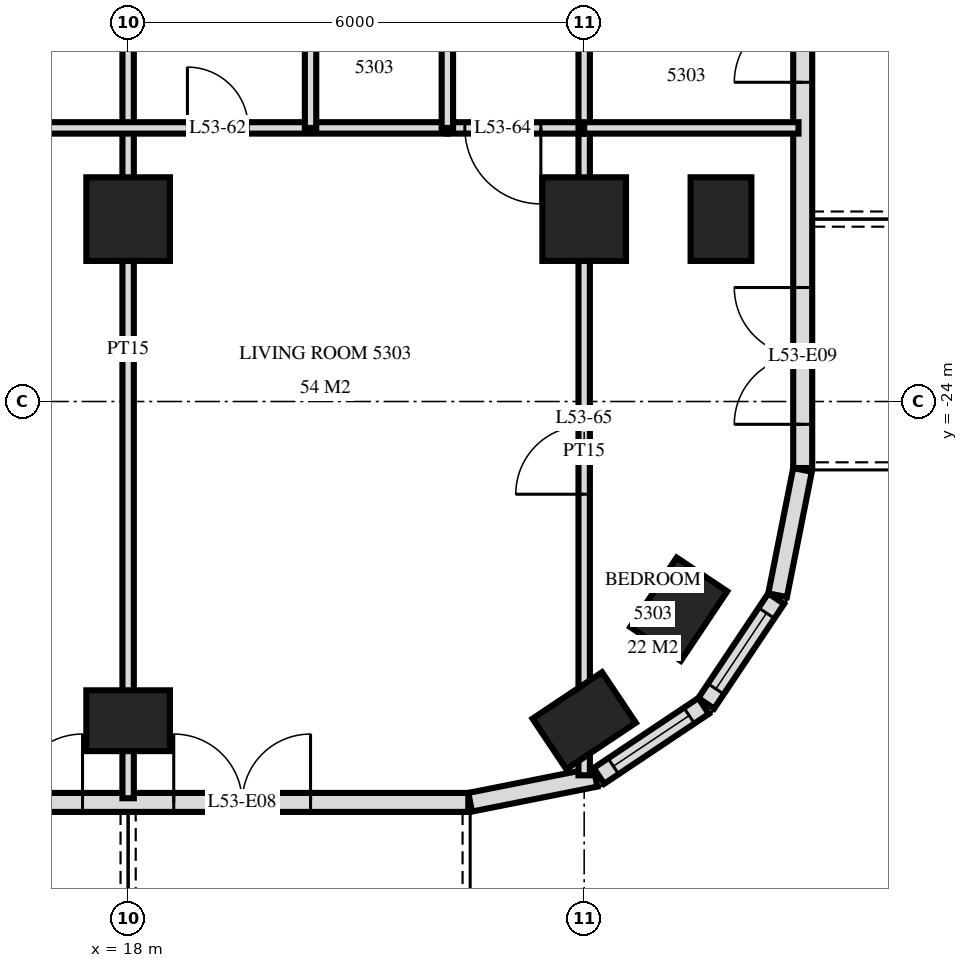
"""IFC4 building model, lengths in metres.
Left out: names, types, materials, properties, quantities, classifications, styles, units other than length and angle.
Written with IfcOpenShell. Run it as: python <this file> out.ifc"""

import sys

from ifc_helpers import new_model, si_unit, direction, frame, frame_2d, origin, origin_2d, place, context, subcontext, project, spatial, rectangle, extrude, element, fill, save


model = new_model("IFC4")
c1 = context("Model", 3, precision=1e-05, world=origin(), true_north=direction((0.0, 1.0)))
c2 = subcontext(c1, "Body", "Model", "MODEL_VIEW")
j1 = project(units=[si_unit("LENGTHUNIT", "METRE"), si_unit("PLANEANGLEUNIT", "RADIAN")], contexts=[c1])
p1 = place(None, origin())
s1 = spatial("IfcSite", under=j1, at=p1, CompositionType="ELEMENT")
p2 = place(p1, origin())
s2 = spatial("IfcBuilding", under=s1, at=p2, CompositionType="ELEMENT")
p3 = place(p2, frame((0.0, 0.0, 204.6)))
s3 = spatial("IfcBuildingStorey", under=s2, at=p3, CompositionType="ELEMENT", Elevation=204.6)
p4 = place(p3, frame((18.0, -28.2, 0.0), z_axis=(0.0, 0.0, 1.0), x_axis=(1.0, 0.0, 0.0)))
e1 = element("IfcColumn", 1, at=p4, inside=s3, PredefinedType="COLUMN", context=c2, shape_type="SweptSolid", body=[
    extrude(rectangle(XDim=1.1, YDim=0.8, at=origin_2d()), origin(), (0.0, 0.0, 1.0), 3.5),
])
p5 = place(p3, frame((18.0, -21.6, 0.0), z_axis=(0.0, 0.0, 1.0), x_axis=(1.0, 0.0, 0.0)))
e2 = element("IfcColumn", 2, at=p5, inside=s3, PredefinedType="COLUMN", context=c2, shape_type="SweptSolid", body=[
    extrude(rectangle(XDim=1.1, YDim=1.1, at=origin_2d()), origin(), (0.0, 0.0, 1.0), 3.5),
])
p6 = place(p3, frame((24.0, -28.2, 0.0), z_axis=(0.0, 0.0, 1.0), x_axis=(0.831459915646, 0.555584744817, 0.0)))
e3 = element("IfcColumn", 3, at=p6, inside=s3, PredefinedType="COLUMN", context=c2, shape_type="SweptSolid", body=[
    extrude(rectangle(XDim=1.1, YDim=0.8, at=origin_2d()), origin(), (0.0, 0.0, 1.0), 3.5),
])
p7 = place(p3, frame((24.0, -21.6, 0.0), z_axis=(0.0, 0.0, 1.0), x_axis=(1.0, 0.0, 0.0)))
e4 = element("IfcColumn", 4, at=p7, inside=s3, PredefinedType="COLUMN", context=c2, shape_type="SweptSolid", body=[
    extrude(rectangle(XDim=1.1, YDim=1.1, at=origin_2d()), origin(), (0.0, 0.0, 1.0), 3.5),
])
for number, where, z_axis, x_axis in (
    (5, (25.244, -26.733, 0.0), (0.0, 0.0, 1.0), (0.556, 0.831, 0.0)),
    (6, (25.8, -21.6, 0.0), (0.0, 0.0, 1.0), (0.0, 1.0, 0.0)),
):
    element("IfcColumn", number, at=place(p3, frame(where, z_axis=z_axis, x_axis=x_axis)), inside=s3, PredefinedType="COLUMN", context=c2, shape_type="SweptSolid", body=[
        extrude(rectangle(XDim=1.1, YDim=0.8, at=origin_2d()), origin(), (0.0, 0.0, 1.0), 3.5),
    ])
p8 = place(p3, frame((-22.475, -29.275, 0.0), z_axis=(0.0, 0.0, 1.0), x_axis=(1.0, 0.0, 0.0)))
e7 = element("IfcWall", 7, at=p8, inside=s3, PredefinedType="SOLIDWALL", context=c2, shape_type="SweptSolid", body=[
    extrude(rectangle(XDim=44.951, YDim=0.25, at=frame_2d((22.475, 0.0))), origin(), (0.0, 0.0, 1.0), 3.22),
])
p9 = place(p8, frame((0.575, 0.0, 0.0)))
e8 = element("IfcOpeningElement", 8, at=p9, cuts=e7, PredefinedType="OPENING", context=c2, shape_type="SweptSolid", body=[
    extrude(rectangle(XDim=1.8, YDim=2.4, at=frame_2d((0.9, 1.2))), frame((0.0, 0.135, 0.0), z_axis=(0.0, -1.0, 0.0), x_axis=(1.0, 0.0, 0.0)), (0.0, 0.0, 1.0), 0.27),
])
p10 = place(p8, frame((6.2, 0.0, 0.0)))
e9 = element("IfcOpeningElement", 9, at=p10, cuts=e7, PredefinedType="OPENING", context=c2, shape_type="SweptSolid", body=[
    extrude(rectangle(XDim=1.8, YDim=2.4, at=frame_2d((0.9, 1.2))), frame((0.0, 0.135, 0.0), z_axis=(0.0, -1.0, 0.0), x_axis=(1.0, 0.0, 0.0)), (0.0, 0.0, 1.0), 0.27),
])
p11 = place(p8, frame((8.45, 0.0, 0.9)))
e10 = element("IfcOpeningElement", 10, at=p11, cuts=e7, PredefinedType="OPENING", context=c2, shape_type="SweptSolid", body=[
    extrude(rectangle(XDim=1.8, YDim=1.5, at=frame_2d((0.9, 0.75))), frame((0.0, 0.135, 0.0), z_axis=(0.0, -1.0, 0.0), x_axis=(1.0, 0.0, 0.0)), (0.0, 0.0, 1.0), 0.27),
])
p12 = place(p8, frame((11.075, 0.0, 0.0)))
e11 = element("IfcOpeningElement", 11, at=p12, cuts=e7, PredefinedType="OPENING", context=c2, shape_type="SweptSolid", body=[
    extrude(rectangle(XDim=1.8, YDim=2.4, at=frame_2d((0.9, 1.2))), frame((0.0, 0.135, 0.0), z_axis=(0.0, -1.0, 0.0), x_axis=(1.0, 0.0, 0.0)), (0.0, 0.0, 1.0), 0.27),
])
p13 = place(p8, frame((13.775, 0.0, 0.9)))
e12 = element("IfcOpeningElement", 12, at=p13, cuts=e7, PredefinedType="OPENING", context=c2, shape_type="SweptSolid", body=[
    extrude(rectangle(XDim=2.4, YDim=1.5, at=frame_2d((1.2, 0.75))), frame((0.0, 0.135, 0.0), z_axis=(0.0, -1.0, 0.0), x_axis=(1.0, 0.0, 0.0)), (0.0, 0.0, 1.0), 0.27),
])
p14 = place(p8, frame((16.775, 0.0, 0.9)))
e13 = element("IfcOpeningElement", 13, at=p14, cuts=e7, PredefinedType="OPENING", context=c2, shape_type="SweptSolid", body=[
    extrude(rectangle(XDim=2.4, YDim=1.5, at=frame_2d((1.2, 0.75))), frame((0.0, 0.135, 0.0), z_axis=(0.0, -1.0, 0.0), x_axis=(1.0, 0.0, 0.0)), (0.0, 0.0, 1.0), 0.27),
])
p15 = place(p8, frame((20.075, 0.0, 0.0)))
e14 = element("IfcOpeningElement", 14, at=p15, cuts=e7, PredefinedType="OPENING", context=c2, shape_type="SweptSolid", body=[
    extrude(rectangle(XDim=1.8, YDim=2.4, at=frame_2d((0.9, 1.2))), frame((0.0, 0.135, 0.0), z_axis=(0.0, -1.0, 0.0), x_axis=(1.0, 0.0, 0.0)), (0.0, 0.0, 1.0), 0.27),
])
p16 = place(p8, frame((23.075, 0.0, 0.0)))
e15 = element("IfcOpeningElement", 15, at=p16, cuts=e7, PredefinedType="OPENING", context=c2, shape_type="SweptSolid", body=[
    extrude(rectangle(XDim=1.8, YDim=2.4, at=frame_2d((0.9, 1.2))), frame((0.0, 0.135, 0.0), z_axis=(0.0, -1.0, 0.0), x_axis=(1.0, 0.0, 0.0)), (0.0, 0.0, 1.0), 0.27),
])
p17 = place(p8, frame((25.775, 0.0, 0.9)))
e16 = element("IfcOpeningElement", 16, at=p17, cuts=e7, PredefinedType="OPENING", context=c2, shape_type="SweptSolid", body=[
    extrude(rectangle(XDim=2.4, YDim=1.5, at=frame_2d((1.2, 0.75))), frame((0.0, 0.135, 0.0), z_axis=(0.0, -1.0, 0.0), x_axis=(1.0, 0.0, 0.0)), (0.0, 0.0, 1.0), 0.27),
])
p18 = place(p8, frame((29.075, 0.0, 0.0)))
e17 = element("IfcOpeningElement", 17, at=p18, cuts=e7, PredefinedType="OPENING", context=c2, shape_type="SweptSolid", body=[
    extrude(rectangle(XDim=1.8, YDim=2.4, at=frame_2d((0.9, 1.2))), frame((0.0, 0.135, 0.0), z_axis=(0.0, -1.0, 0.0), x_axis=(1.0, 0.0, 0.0)), (0.0, 0.0, 1.0), 0.27),
])
p19 = place(p8, frame((31.775, 0.0, 0.9)))
e18 = element("IfcOpeningElement", 18, at=p19, cuts=e7, PredefinedType="OPENING", context=c2, shape_type="SweptSolid", body=[
    extrude(rectangle(XDim=2.4, YDim=1.5, at=frame_2d((1.2, 0.75))), frame((0.0, 0.135, 0.0), z_axis=(0.0, -1.0, 0.0), x_axis=(1.0, 0.0, 0.0)), (0.0, 0.0, 1.0), 0.27),
])
p20 = place(p8, frame((34.775, 0.0, 0.9)))
e19 = element("IfcOpeningElement", 19, at=p20, cuts=e7, PredefinedType="OPENING", context=c2, shape_type="SweptSolid", body=[
    extrude(rectangle(XDim=2.4, YDim=1.5, at=frame_2d((1.2, 0.75))), frame((0.0, 0.135, 0.0), z_axis=(0.0, -1.0, 0.0), x_axis=(1.0, 0.0, 0.0)), (0.0, 0.0, 1.0), 0.27),
])
p21 = place(p8, frame((38.075, 0.0, 0.0)))
e20 = element("IfcOpeningElement", 20, at=p21, cuts=e7, PredefinedType="OPENING", context=c2, shape_type="SweptSolid", body=[
    extrude(rectangle(XDim=1.8, YDim=2.4, at=frame_2d((0.9, 1.2))), frame((0.0, 0.135, 0.0), z_axis=(0.0, -1.0, 0.0), x_axis=(1.0, 0.0, 0.0)), (0.0, 0.0, 1.0), 0.27),
])
p22 = place(p8, frame((41.075, 0.0, 0.0)))
e21 = element("IfcOpeningElement", 21, at=p22, cuts=e7, PredefinedType="OPENING", context=c2, shape_type="SweptSolid", body=[
    extrude(rectangle(XDim=1.8, YDim=2.4, at=frame_2d((0.9, 1.2))), frame((0.0, 0.135, 0.0), z_axis=(0.0, -1.0, 0.0), x_axis=(1.0, 0.0, 0.0)), (0.0, 0.0, 1.0), 0.27),
])
p23 = place(p3, frame((22.5, -29.273, 0.0), z_axis=(0.0, 0.0, 1.0), x_axis=(0.980775640221, 0.19513878023, 0.0)))
e22 = element("IfcWall", 22, at=p23, inside=s3, PredefinedType="SOLIDWALL", context=c2, shape_type="SweptSolid", body=[
    extrude(rectangle(XDim=1.681, YDim=0.25, at=frame_2d((0.841, 0.0))), origin(), (0.0, 0.0, 1.0), 3.22),
])
p24 = place(p3, frame((24.194, -28.926, 0.0), z_axis=(0.0, 0.0, 1.0), x_axis=(0.831482937015, 0.55555029066, 0.0)))
e23 = element("IfcWall", 23, at=p24, inside=s3, PredefinedType="SOLIDWALL", context=c2, shape_type="SweptSolid", body=[
    extrude(rectangle(XDim=1.656, YDim=0.25, at=frame_2d((0.828, 0.0))), origin(), (0.0, 0.0, 1.0), 3.22),
])
p25 = place(p24, frame((0.228, 0.0, 0.9)))
e24 = element("IfcOpeningElement", 24, at=p25, cuts=e23, PredefinedType="OPENING", context=c2, shape_type="SweptSolid", body=[
    extrude(rectangle(XDim=1.2, YDim=1.5, at=frame_2d((0.6, 0.75))), frame((0.0, 0.135, 0.0), z_axis=(0.0, -1.0, 0.0), x_axis=(1.0, 0.0, 0.0)), (0.0, 0.0, 1.0), 0.27),
])
p26 = place(p3, frame((25.606, -27.971, 0.0), z_axis=(0.0, 0.0, 1.0), x_axis=(0.55555029066, 0.831482937015, 0.0)))
e25 = element("IfcWall", 25, at=p26, inside=s3, PredefinedType="SOLIDWALL", context=c2, shape_type="SweptSolid", body=[
    extrude(rectangle(XDim=1.656, YDim=0.25, at=frame_2d((0.828, 0.0))), origin(), (0.0, 0.0, 1.0), 3.22),
])
p27 = place(p26, frame((0.228, 0.0, 0.9)))
e26 = element("IfcOpeningElement", 26, at=p27, cuts=e25, PredefinedType="OPENING", context=c2, shape_type="SweptSolid", body=[
    extrude(rectangle(XDim=1.2, YDim=1.5, at=frame_2d((0.6, 0.75))), frame((0.0, 0.135, 0.0), z_axis=(0.0, -1.0, 0.0), x_axis=(1.0, 0.0, 0.0)), (0.0, 0.0, 1.0), 0.27),
])
p28 = place(p3, frame((26.545, -26.549, 0.0), z_axis=(0.0, 0.0, 1.0), x_axis=(0.195026884138, 0.980797896849, 0.0)))
e27 = element("IfcWall", 27, at=p28, inside=s3, PredefinedType="SOLIDWALL", context=c2, shape_type="SweptSolid", body=[
    extrude(rectangle(XDim=1.681, YDim=0.25, at=frame_2d((0.841, 0.0))), origin(), (0.0, 0.0, 1.0), 3.22),
])
p29 = place(p3, frame((26.875, -24.875, 0.0), z_axis=(0.0, 0.0, 1.0), x_axis=(0.0, 1.0, 0.0)))
e28 = element("IfcWall", 28, at=p29, inside=s3, PredefinedType="SOLIDWALL", context=c2, shape_type="SweptSolid", body=[
    extrude(rectangle(XDim=21.551, YDim=0.25, at=frame_2d((10.775, 0.0))), origin(), (0.0, 0.0, 1.0), 3.22),
])
p30 = place(p29, frame((0.575, 0.0, 0.0)))
e29 = element("IfcOpeningElement", 29, at=p30, cuts=e28, PredefinedType="OPENING", context=c2, shape_type="SweptSolid", body=[
    extrude(rectangle(XDim=1.8, YDim=2.4, at=frame_2d((0.9, 1.2))), frame((0.0, 0.135, 0.0), z_axis=(0.0, -1.0, 0.0), x_axis=(1.0, 0.0, 0.0)), (0.0, 0.0, 1.0), 0.27),
])
p31 = place(p29, frame((5.075, 0.0, 0.0)))
e30 = element("IfcOpeningElement", 30, at=p31, cuts=e28, PredefinedType="OPENING", context=c2, shape_type="SweptSolid", body=[
    extrude(rectangle(XDim=1.8, YDim=2.4, at=frame_2d((0.9, 1.2))), frame((0.0, 0.135, 0.0), z_axis=(0.0, -1.0, 0.0), x_axis=(1.0, 0.0, 0.0)), (0.0, 0.0, 1.0), 0.27),
])
p32 = place(p29, frame((8.075, 0.0, 0.9)))
e31 = element("IfcOpeningElement", 31, at=p32, cuts=e28, PredefinedType="OPENING", context=c2, shape_type="SweptSolid", body=[
    extrude(rectangle(XDim=1.2, YDim=1.5, at=frame_2d((0.6, 0.75))), frame((0.0, 0.135, 0.0), z_axis=(0.0, -1.0, 0.0), x_axis=(1.0, 0.0, 0.0)), (0.0, 0.0, 1.0), 0.27),
])
p33 = place(p29, frame((13.1, 0.0, 0.0)))
e32 = element("IfcOpeningElement", 32, at=p33, cuts=e28, PredefinedType="OPENING", context=c2, shape_type="SweptSolid", body=[
    extrude(rectangle(XDim=1.8, YDim=2.4, at=frame_2d((0.9, 1.2))), frame((0.0, 0.135, 0.0), z_axis=(0.0, -1.0, 0.0), x_axis=(1.0, 0.0, 0.0)), (0.0, 0.0, 1.0), 0.27),
])
p34 = place(p3, frame((24.0, -20.4, 0.0), z_axis=(0.0, 0.0, 1.0), x_axis=(0.0, 1.0, 0.0)))
e33 = element("IfcWall", 33, at=p34, inside=s3, PredefinedType="PARTITIONING", context=c2, shape_type="SweptSolid", body=[
    extrude(rectangle(XDim=3.0, YDim=0.15, at=frame_2d((1.5, 0.0))), origin(), (0.0, 0.0, 1.0), 3.22),
])
p35 = place(p34, frame((1.02, 0.0, 0.0)))
e34 = element("IfcOpeningElement", 34, at=p35, cuts=e33, PredefinedType="OPENING", context=c2, shape_type="SweptSolid", body=[
    extrude(rectangle(XDim=1.0, YDim=2.1, at=frame_2d((0.5, 1.05))), frame((0.0, 0.085, 0.0), z_axis=(0.0, -1.0, 0.0), x_axis=(1.0, 0.0, 0.0)), (0.0, 0.0, 1.0), 0.17),
])
p36 = place(p3, frame((24.0, -28.918, 0.0), z_axis=(0.0, 0.0, 1.0), x_axis=(0.0, 1.0, 0.0)))
e35 = element("IfcWall", 35, at=p36, inside=s3, PredefinedType="PARTITIONING", context=c2, shape_type="SweptSolid", body=[
    extrude(rectangle(XDim=8.518, YDim=0.15, at=frame_2d((4.259, 0.0))), origin(), (0.0, 0.0, 1.0), 3.22),
])
p37 = place(p36, frame((3.698, 0.0, 0.0)))
e36 = element("IfcOpeningElement", 36, at=p37, cuts=e35, PredefinedType="OPENING", context=c2, shape_type="SweptSolid", body=[
    extrude(rectangle(XDim=0.9, YDim=2.1, at=frame_2d((0.45, 1.05))), frame((0.0, 0.085, 0.0), z_axis=(0.0, -1.0, 0.0), x_axis=(1.0, 0.0, 0.0)), (0.0, 0.0, 1.0), 0.17),
])
for number, where, z_axis, x_axis in (
    (37, (22.2, -20.4, 0.0), (0.0, 0.0, 1.0), (0.0, 1.0, 0.0)),
    (38, (20.4, -20.4, 0.0), (0.0, 0.0, 1.0), (0.0, 1.0, 0.0)),
):
    element("IfcWall", number, at=place(p3, frame(where, z_axis=z_axis, x_axis=x_axis)), inside=s3, PredefinedType="PARTITIONING", context=c2, shape_type="SweptSolid", body=[
        extrude(rectangle(XDim=3.0, YDim=0.15, at=frame_2d((1.5, 0.0))), origin(), (0.0, 0.0, 1.0), 3.22),
    ])
p38 = place(p3, frame((18.0, -29.22, 0.0), z_axis=(0.0, 0.0, 1.0), x_axis=(0.0, 1.0, 0.0)))
e39 = element("IfcWall", 39, at=p38, inside=s3, PredefinedType="PARTITIONING", context=c2, shape_type="SweptSolid", body=[
    extrude(rectangle(XDim=11.82, YDim=0.15, at=frame_2d((5.91, 0.0))), origin(), (0.0, 0.0, 1.0), 3.22),
])
p39 = place(p3, frame((22.2, -20.4, 0.0), z_axis=(0.0, 0.0, 1.0), x_axis=(1.0, 0.0, 0.0)))
e40 = element("IfcWall", 40, at=p39, inside=s3, PredefinedType="PARTITIONING", context=c2, shape_type="SweptSolid", body=[
    extrude(rectangle(XDim=1.8, YDim=0.15, at=frame_2d((0.9, 0.0))), origin(), (0.0, 0.0, 1.0), 3.22),
])
p40 = place(p39, frame((0.23, 0.0, 0.0)))
e41 = element("IfcOpeningElement", 41, at=p40, cuts=e40, PredefinedType="OPENING", context=c2, shape_type="SweptSolid", body=[
    extrude(rectangle(XDim=1.0, YDim=2.1, at=frame_2d((0.5, 1.05))), frame((0.0, 0.085, 0.0), z_axis=(0.0, -1.0, 0.0), x_axis=(1.0, 0.0, 0.0)), (0.0, 0.0, 1.0), 0.17),
])
p41 = place(p3, frame((15.6, -20.4, 0.0), z_axis=(0.0, 0.0, 1.0), x_axis=(1.0, 0.0, 0.0)))
e42 = element("IfcWall", 42, at=p41, inside=s3, PredefinedType="PARTITIONING", context=c2, shape_type="SweptSolid", body=[
    extrude(rectangle(XDim=6.6, YDim=0.15, at=frame_2d((3.3, 0.0))), origin(), (0.0, 0.0, 1.0), 3.22),
])
p42 = place(p41, frame((3.18, 0.0, 0.0)))
e43 = element("IfcOpeningElement", 43, at=p42, cuts=e42, PredefinedType="OPENING", context=c2, shape_type="SweptSolid", body=[
    extrude(rectangle(XDim=0.8, YDim=2.1, at=frame_2d((0.4, 1.05))), frame((0.0, 0.085, 0.0), z_axis=(0.0, -1.0, 0.0), x_axis=(1.0, 0.0, 0.0)), (0.0, 0.0, 1.0), 0.17),
])
p43 = place(p3, frame((24.0, -20.4, 0.0), z_axis=(0.0, 0.0, 1.0), x_axis=(1.0, 0.0, 0.0)))
e44 = element("IfcWall", 44, at=p43, inside=s3, PredefinedType="PARTITIONING", context=c2, shape_type="SweptSolid", body=[
    extrude(rectangle(XDim=2.82, YDim=0.15, at=frame_2d((1.41, 0.0))), origin(), (0.0, 0.0, 1.0), 3.22),
])
p44 = place(p25, origin())
e45 = element("IfcWindow", 45, at=p44, inside=s3, PartitioningType="SINGLE_PANEL", PredefinedType="WINDOW", context=c2, shape_type="SweptSolid", body=[
    extrude(rectangle(XDim=1.2, YDim=1.5, at=frame_2d((0.6, 0.75))), frame((0.0, 0.03, 0.0), z_axis=(0.0, -1.0, 0.0), x_axis=(1.0, 0.0, 0.0)), (0.0, 0.0, 1.0), 0.06),
])
fill(e24, e45)
p45 = place(p27, origin())
e46 = element("IfcWindow", 46, at=p45, inside=s3, PartitioningType="SINGLE_PANEL", PredefinedType="WINDOW", context=c2, shape_type="SweptSolid", body=[
    extrude(rectangle(XDim=1.2, YDim=1.5, at=frame_2d((0.6, 0.75))), frame((0.0, 0.03, 0.0), z_axis=(0.0, -1.0, 0.0), x_axis=(1.0, 0.0, 0.0)), (0.0, 0.0, 1.0), 0.06),
])
fill(e26, e46)
p46 = place(p21, origin())
e47 = element("IfcDoor", 47, at=p46, inside=s3, OperationType="DOUBLE_DOOR_SINGLE_SWING", PredefinedType="DOOR", context=c2, shape_type="SweptSolid", body=[
    extrude(rectangle(XDim=1.8, YDim=2.4, at=frame_2d((0.9, 1.2))), frame((0.0, 0.025, 0.0), z_axis=(0.0, -1.0, 0.0), x_axis=(1.0, 0.0, 0.0)), (0.0, 0.0, 1.0), 0.05),
])
fill(e20, e47)
p47 = place(p22, origin())
e48 = element("IfcDoor", 48, at=p47, inside=s3, OperationType="DOUBLE_DOOR_SINGLE_SWING", PredefinedType="DOOR", context=c2, shape_type="SweptSolid", body=[
    extrude(rectangle(XDim=1.8, YDim=2.4, at=frame_2d((0.9, 1.2))), frame((0.0, 0.025, 0.0), z_axis=(0.0, -1.0, 0.0), x_axis=(1.0, 0.0, 0.0)), (0.0, 0.0, 1.0), 0.05),
])
fill(e21, e48)
p48 = place(p30, origin())
e49 = element("IfcDoor", 49, at=p48, inside=s3, OperationType="DOUBLE_DOOR_SINGLE_SWING", PredefinedType="DOOR", context=c2, shape_type="SweptSolid", body=[
    extrude(rectangle(XDim=1.8, YDim=2.4, at=frame_2d((0.9, 1.2))), frame((0.0, 0.025, 0.0), z_axis=(0.0, -1.0, 0.0), x_axis=(1.0, 0.0, 0.0)), (0.0, 0.0, 1.0), 0.05),
])
fill(e29, e49)
p49 = place(p31, origin())
e50 = element("IfcDoor", 50, at=p49, inside=s3, OperationType="DOUBLE_DOOR_SINGLE_SWING", PredefinedType="DOOR", context=c2, shape_type="SweptSolid", body=[
    extrude(rectangle(XDim=1.8, YDim=2.4, at=frame_2d((0.9, 1.2))), frame((0.0, 0.025, 0.0), z_axis=(0.0, -1.0, 0.0), x_axis=(1.0, 0.0, 0.0)), (0.0, 0.0, 1.0), 0.05),
])
fill(e30, e50)
p50 = place(p42, origin())
e51 = element("IfcDoor", 51, at=p50, inside=s3, OperationType="SINGLE_SWING_RIGHT", PredefinedType="DOOR", context=c2, shape_type="SweptSolid", body=[
    extrude(rectangle(XDim=0.8, YDim=2.1, at=frame_2d((0.4, 1.05))), frame((0.0, 0.025, 0.0), z_axis=(0.0, -1.0, 0.0), x_axis=(1.0, 0.0, 0.0)), (0.0, 0.0, 1.0), 0.05),
])
fill(e43, e51)
p51 = place(p40, frame((0.5, 0.0, 0.0), z_axis=(0.0, 0.0, 1.0), x_axis=(-1.0, 0.0, 0.0)))
e52 = element("IfcDoor", 52, at=p51, inside=s3, OperationType="SINGLE_SWING_RIGHT", PredefinedType="DOOR", context=c2, shape_type="SweptSolid", body=[
    extrude(rectangle(XDim=1.0, YDim=2.1, at=frame_2d((0.0, 1.05))), frame((0.0, -0.025, 0.0), z_axis=(0.0, 1.0, 0.0), x_axis=(-1.0, 0.0, 0.0)), (0.0, 0.0, 1.0), 0.05),
])
fill(e41, e52)
p52 = place(p37, origin())
e53 = element("IfcDoor", 53, at=p52, inside=s3, OperationType="SINGLE_SWING_RIGHT", PredefinedType="DOOR", context=c2, shape_type="SweptSolid", body=[
    extrude(rectangle(XDim=0.9, YDim=2.1, at=frame_2d((0.45, 1.05))), frame((0.0, 0.025, 0.0), z_axis=(0.0, -1.0, 0.0), x_axis=(1.0, 0.0, 0.0)), (0.0, 0.0, 1.0), 0.05),
])
fill(e36, e53)
save(model, sys.argv[1])
